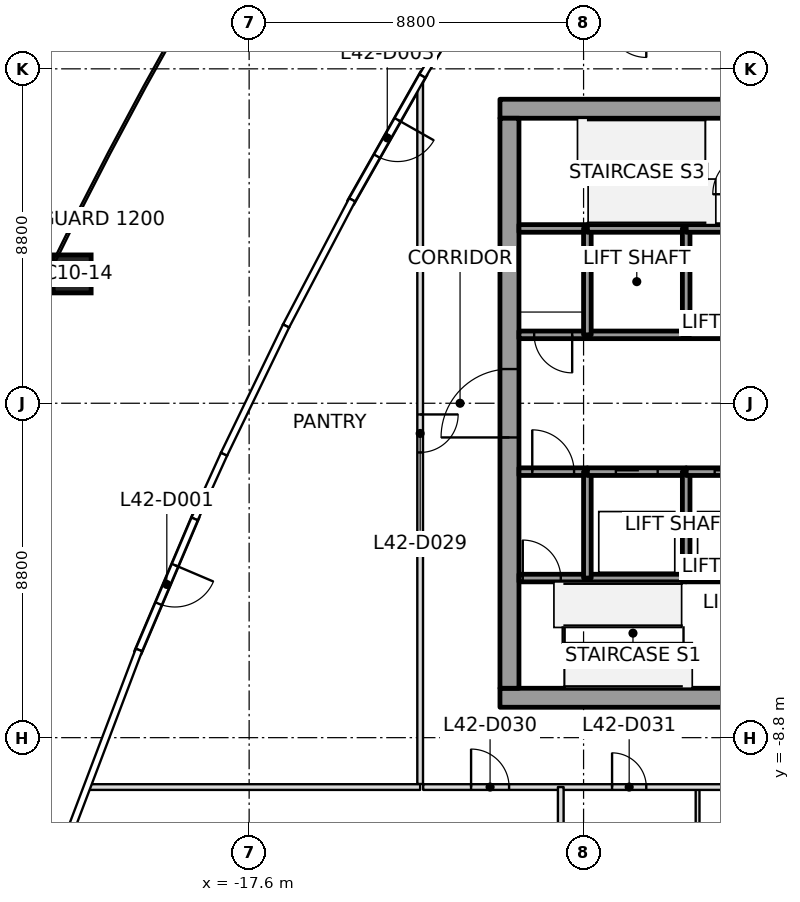
"""IFC4 building model, lengths in metres.
Left out: names, types, materials, properties, quantities, classifications, styles, units other than length and angle.
Written with IfcOpenShell. Run it as: python <this file> out.ifc"""

import sys

from ifc_helpers import new_model, si_unit, direction, frame, frame_2d, origin, origin_2d, place, context, subcontext, project, spatial, rectangle, extrude, element, fill, save


model = new_model("IFC4")
c1 = context("Model", 3, precision=1e-05, world=origin(), true_north=direction((0.0, 1.0)))
c2 = subcontext(c1, "Body", "Model", "MODEL_VIEW")
j1 = project(units=[si_unit("LENGTHUNIT", "METRE"), si_unit("PLANEANGLEUNIT", "RADIAN")], contexts=[c1])
p1 = place(None, origin())
s1 = spatial("IfcSite", under=j1, at=p1, CompositionType="ELEMENT")
p2 = place(p1, origin())
s2 = spatial("IfcBuilding", under=s1, at=p2, CompositionType="ELEMENT")
p3 = place(p2, frame((0.0, 0.0, 189.8)))
s3 = spatial("IfcBuildingStorey", under=s2, at=p3, CompositionType="ELEMENT", Elevation=189.8)
p4 = place(p3, frame((-22.257, 3.404, 0.0), z_axis=(0.014036674448, 0.002013957638, 0.999899452818), x_axis=(0.440228043652, 0.897850463868, -0.007988373739)))
e1 = element("IfcColumn", 1, at=p4, inside=s3, PredefinedType="COLUMN", context=c2, shape_type="SweptSolid", body=[
    extrude(rectangle(XDim=1.0, YDim=1.0, at=origin_2d()), origin(), (0.0, 0.0, 1.0), 4.0),
])
p5 = place(p3, frame((-11.0, -7.75, 0.0), z_axis=(0.0, 0.0, 1.0), x_axis=(1.0, 0.0, 0.0)))
e2 = element("IfcWall", 2, at=p5, inside=s3, PredefinedType="SHEAR", context=c2, shape_type="SweptSolid", body=[
    extrude(rectangle(XDim=22.0, YDim=0.5, at=frame_2d((11.0, 0.0))), origin(), (0.0, 0.0, 1.0), 4.0),
])
p6 = place(p5, frame((10.45, 0.0, 0.0)))
e3 = element("IfcOpeningElement", 3, at=p6, cuts=e2, PredefinedType="OPENING", context=c2, shape_type="SweptSolid", body=[
    extrude(rectangle(XDim=1.1, YDim=2.1, at=frame_2d((0.55, 1.05))), frame((0.0, 0.25, 0.0), z_axis=(0.0, -1.0, 0.0), x_axis=(1.0, 0.0, 0.0)), (0.0, 0.0, 1.0), 0.5),
])
p7 = place(p3, frame((-11.0, 7.75, 0.0), z_axis=(0.0, 0.0, 1.0), x_axis=(1.0, 0.0, 0.0)))
e4 = element("IfcWall", 4, at=p7, inside=s3, PredefinedType="SHEAR", context=c2, shape_type="SweptSolid", body=[
    extrude(rectangle(XDim=22.0, YDim=0.5, at=frame_2d((11.0, 0.0))), origin(), (0.0, 0.0, 1.0), 4.0),
])
p8 = place(p7, frame((10.45, 0.0, 0.0)))
e5 = element("IfcOpeningElement", 5, at=p8, cuts=e4, PredefinedType="OPENING", context=c2, shape_type="SweptSolid", body=[
    extrude(rectangle(XDim=1.1, YDim=2.1, at=frame_2d((0.55, 1.05))), frame((0.0, 0.25, 0.0), z_axis=(0.0, -1.0, 0.0), x_axis=(1.0, 0.0, 0.0)), (0.0, 0.0, 1.0), 0.5),
])
p9 = place(p3, frame((-10.75, -7.5, 0.0), z_axis=(0.0, 0.0, 1.0), x_axis=(0.0, 1.0, 0.0)))
e6 = element("IfcWall", 6, at=p9, inside=s3, PredefinedType="SHEAR", context=c2, shape_type="SweptSolid", body=[
    extrude(rectangle(XDim=15.0, YDim=0.5, at=frame_2d((7.5, 0.0))), origin(), (0.0, 0.0, 1.0), 4.0),
])
p10 = place(p9, frame((6.6, 0.0, 0.0)))
e7 = element("IfcOpeningElement", 7, at=p10, cuts=e6, PredefinedType="OPENING", context=c2, shape_type="SweptSolid", body=[
    extrude(rectangle(XDim=1.8, YDim=2.1, at=frame_2d((0.9, 1.05))), frame((0.0, 0.25, 0.0), z_axis=(0.0, -1.0, 0.0), x_axis=(1.0, 0.0, 0.0)), (0.0, 0.0, 1.0), 0.5),
])
p11 = place(p3, frame((-12.998, 8.689, 0.0), z_axis=(0.0, 0.0, 1.0), x_axis=(-0.492974917458, -0.870043522335, 0.0)))
e8 = element("IfcWall", 8, at=p11, inside=s3, PredefinedType="SOLIDWALL", context=c2, shape_type="SweptSolid", body=[
    extrude(rectangle(XDim=3.926, YDim=0.2, at=frame_2d((1.963, 0.0))), origin(), (0.0, 0.0, 1.0), 3.34),
])
p12 = place(p11, frame((1.413, 0.0, 0.0)))
e9 = element("IfcOpeningElement", 9, at=p12, cuts=e8, PredefinedType="OPENING", context=c2, shape_type="SweptSolid", body=[
    extrude(rectangle(XDim=1.1, YDim=2.1, at=frame_2d((0.55, 1.05))), frame((0.0, 0.1, 0.0), z_axis=(0.0, -1.0, 0.0), x_axis=(1.0, 0.0, 0.0)), (0.0, 0.0, 1.0), 0.2),
])
p13 = place(p3, frame((-18.999, -2.961, 0.0), z_axis=(0.0, 0.0, 1.0), x_axis=(-0.391065585554, -0.920362813132, 0.0)))
e10 = element("IfcWall", 10, at=p13, inside=s3, PredefinedType="SOLIDWALL", context=c2, shape_type="SweptSolid", body=[
    extrude(rectangle(XDim=3.926, YDim=0.2, at=frame_2d((1.963, 0.0))), origin(), (0.0, 0.0, 1.0), 3.247),
])
p14 = place(p13, frame((1.413, 0.0, 0.0)))
e11 = element("IfcOpeningElement", 11, at=p14, cuts=e10, PredefinedType="OPENING", context=c2, shape_type="SweptSolid", body=[
    extrude(rectangle(XDim=1.1, YDim=2.1, at=frame_2d((0.55, 1.05))), frame((0.0, 0.1, 0.0), z_axis=(0.0, -1.0, 0.0), x_axis=(1.0, 0.0, 0.0)), (0.0, 0.0, 1.0), 0.2),
])
p15 = place(p3, frame((-10.5, -4.6, 0.0), z_axis=(0.0, 0.0, 1.0), x_axis=(1.0, 0.0, 0.0)))
e12 = element("IfcWall", 12, at=p15, inside=s3, PredefinedType="SOLIDWALL", context=c2, shape_type="SweptSolid", body=[
    extrude(rectangle(XDim=1.8, YDim=0.2, at=frame_2d((0.9, 0.0))), origin(), (0.0, 0.0, 1.0), 3.85),
])
p16 = place(p15, frame((0.1, 0.0, 0.0)))
e13 = element("IfcOpeningElement", 13, at=p16, cuts=e12, PredefinedType="OPENING", context=c2, shape_type="SweptSolid", body=[
    extrude(rectangle(XDim=1.0, YDim=2.1, at=frame_2d((0.5, 1.05))), frame((0.0, 0.1, 0.0), z_axis=(0.0, -1.0, 0.0), x_axis=(1.0, 0.0, 0.0)), (0.0, 0.0, 1.0), 0.2),
])
p17 = place(p3, frame((-10.5, -1.8, 0.0), z_axis=(0.0, 0.0, 1.0), x_axis=(1.0, 0.0, 0.0)))
e14 = element("IfcWall", 14, at=p17, inside=s3, PredefinedType="SOLIDWALL", context=c2, shape_type="SweptSolid", body=[
    extrude(rectangle(XDim=1.8, YDim=0.2, at=frame_2d((0.9, 0.0))), origin(), (0.0, 0.0, 1.0), 3.85),
])
p18 = place(p17, frame((0.35, 0.0, 0.0)))
e15 = element("IfcOpeningElement", 15, at=p18, cuts=e14, PredefinedType="OPENING", context=c2, shape_type="SweptSolid", body=[
    extrude(rectangle(XDim=1.1, YDim=2.1, at=frame_2d((0.55, 1.05))), frame((0.0, 0.1, 0.0), z_axis=(0.0, -1.0, 0.0), x_axis=(1.0, 0.0, 0.0)), (0.0, 0.0, 1.0), 0.2),
])
p19 = place(p3, frame((-8.7, 1.8, 0.0), z_axis=(0.0, 0.0, 1.0), x_axis=(-1.0, 0.0, 0.0)))
e16 = element("IfcWall", 16, at=p19, inside=s3, PredefinedType="SOLIDWALL", context=c2, shape_type="SweptSolid", body=[
    extrude(rectangle(XDim=1.8, YDim=0.2, at=frame_2d((0.9, 0.0))), origin(), (0.0, 0.0, 1.0), 3.85),
])
p20 = place(p19, frame((0.4, 0.0, 0.0)))
e17 = element("IfcOpeningElement", 17, at=p20, cuts=e16, PredefinedType="OPENING", context=c2, shape_type="SweptSolid", body=[
    extrude(rectangle(XDim=1.0, YDim=2.1, at=frame_2d((0.5, 1.05))), frame((0.0, 0.1, 0.0), z_axis=(0.0, -1.0, 0.0), x_axis=(1.0, 0.0, 0.0)), (0.0, 0.0, 1.0), 0.2),
])
p21 = place(p3, frame((-8.7, 4.6, 0.0), z_axis=(0.0, 0.0, 1.0), x_axis=(-1.0, 0.0, 0.0)))
e18 = element("IfcWall", 18, at=p21, inside=s3, PredefinedType="SOLIDWALL", context=c2, shape_type="SweptSolid", body=[
    extrude(rectangle(XDim=1.8, YDim=0.2, at=frame_2d((0.9, 0.0))), origin(), (0.0, 0.0, 1.0), 3.85),
])
p22 = place(p3, frame((-8.7, -4.6, 0.0), z_axis=(0.0, 0.0, 1.0), x_axis=(1.0, 0.0, 0.0)))
e19 = element("IfcWall", 19, at=p22, inside=s3, PredefinedType="SOLIDWALL", context=c2, shape_type="SweptSolid", body=[
    extrude(rectangle(XDim=2.6, YDim=0.2, at=frame_2d((1.3, 0.0))), origin(), (0.0, 0.0, 1.0), 3.85),
])
p23 = place(p3, frame((-8.7, -4.6, 0.0), z_axis=(0.0, 0.0, 1.0), x_axis=(0.0, 1.0, 0.0)))
e20 = element("IfcWall", 20, at=p23, inside=s3, PredefinedType="SOLIDWALL", context=c2, shape_type="SweptSolid", body=[
    extrude(rectangle(XDim=2.8, YDim=0.2, at=frame_2d((1.4, 0.0))), origin(), (0.0, 0.0, 1.0), 3.85),
])
p24 = place(p3, frame((-8.7, -1.8, 0.0), z_axis=(0.0, 0.0, 1.0), x_axis=(1.0, 0.0, 0.0)))
e21 = element("IfcWall", 21, at=p24, inside=s3, PredefinedType="SOLIDWALL", context=c2, shape_type="SweptSolid", body=[
    extrude(rectangle(XDim=2.6, YDim=0.2, at=frame_2d((1.3, 0.0))), origin(), (0.0, 0.0, 1.0), 3.85),
])
p25 = place(p24, frame((0.75, 0.0, 0.0)))
e22 = element("IfcOpeningElement", 22, at=p25, cuts=e21, PredefinedType="OPENING", context=c2, shape_type="SweptSolid", body=[
    extrude(rectangle(XDim=1.1, YDim=2.1, at=frame_2d((0.55, 1.05))), frame((0.0, 0.1, 0.0), z_axis=(0.0, -1.0, 0.0), x_axis=(1.0, 0.0, 0.0)), (0.0, 0.0, 1.0), 0.2),
])
p26 = place(p3, frame((-6.1, 1.8, 0.0), z_axis=(0.0, 0.0, 1.0), x_axis=(-1.0, 0.0, 0.0)))
e23 = element("IfcWall", 23, at=p26, inside=s3, PredefinedType="SOLIDWALL", context=c2, shape_type="SweptSolid", body=[
    extrude(rectangle(XDim=2.6, YDim=0.2, at=frame_2d((1.3, 0.0))), origin(), (0.0, 0.0, 1.0), 3.85),
])
p27 = place(p3, frame((-8.7, 1.8, 0.0), z_axis=(0.0, 0.0, 1.0), x_axis=(0.0, 1.0, 0.0)))
e24 = element("IfcWall", 24, at=p27, inside=s3, PredefinedType="SOLIDWALL", context=c2, shape_type="SweptSolid", body=[
    extrude(rectangle(XDim=2.8, YDim=0.2, at=frame_2d((1.4, 0.0))), origin(), (0.0, 0.0, 1.0), 3.85),
])
p28 = place(p3, frame((-6.1, 4.6, 0.0), z_axis=(0.0, 0.0, 1.0), x_axis=(-1.0, 0.0, 0.0)))
e25 = element("IfcWall", 25, at=p28, inside=s3, PredefinedType="SOLIDWALL", context=c2, shape_type="SweptSolid", body=[
    extrude(rectangle(XDim=2.6, YDim=0.2, at=frame_2d((1.3, 0.0))), origin(), (0.0, 0.0, 1.0), 3.85),
])
p29 = place(p3, frame((-6.1, -4.6, 0.0), z_axis=(0.0, 0.0, 1.0), x_axis=(1.0, 0.0, 0.0)))
e26 = element("IfcWall", 26, at=p29, inside=s3, PredefinedType="SOLIDWALL", context=c2, shape_type="SweptSolid", body=[
    extrude(rectangle(XDim=1.6, YDim=0.2, at=frame_2d((0.8, 0.0))), origin(), (0.0, 0.0, 1.0), 3.85),
])
p30 = place(p3, frame((-6.1, -4.6, 0.0), z_axis=(0.0, 0.0, 1.0), x_axis=(0.0, 1.0, 0.0)))
e27 = element("IfcWall", 27, at=p30, inside=s3, PredefinedType="SOLIDWALL", context=c2, shape_type="SweptSolid", body=[
    extrude(rectangle(XDim=2.8, YDim=0.2, at=frame_2d((1.4, 0.0))), origin(), (0.0, 0.0, 1.0), 3.85),
])
p31 = place(p3, frame((-6.1, -1.8, 0.0), z_axis=(0.0, 0.0, 1.0), x_axis=(1.0, 0.0, 0.0)))
e28 = element("IfcWall", 28, at=p31, inside=s3, PredefinedType="SOLIDWALL", context=c2, shape_type="SweptSolid", body=[
    extrude(rectangle(XDim=2.6, YDim=0.2, at=frame_2d((1.3, 0.0))), origin(), (0.0, 0.0, 1.0), 3.85),
])
p32 = place(p31, frame((0.75, 0.0, 0.0)))
e29 = element("IfcOpeningElement", 29, at=p32, cuts=e28, PredefinedType="OPENING", context=c2, shape_type="SweptSolid", body=[
    extrude(rectangle(XDim=1.1, YDim=2.1, at=frame_2d((0.55, 1.05))), frame((0.0, 0.1, 0.0), z_axis=(0.0, -1.0, 0.0), x_axis=(1.0, 0.0, 0.0)), (0.0, 0.0, 1.0), 0.2),
])
p33 = place(p3, frame((-3.5, 1.8, 0.0), z_axis=(0.0, 0.0, 1.0), x_axis=(-1.0, 0.0, 0.0)))
e30 = element("IfcWall", 30, at=p33, inside=s3, PredefinedType="SOLIDWALL", context=c2, shape_type="SweptSolid", body=[
    extrude(rectangle(XDim=2.6, YDim=0.2, at=frame_2d((1.3, 0.0))), origin(), (0.0, 0.0, 1.0), 3.85),
])
p34 = place(p3, frame((-6.1, 1.8, 0.0), z_axis=(0.0, 0.0, 1.0), x_axis=(0.0, 1.0, 0.0)))
e31 = element("IfcWall", 31, at=p34, inside=s3, PredefinedType="SOLIDWALL", context=c2, shape_type="SweptSolid", body=[
    extrude(rectangle(XDim=2.8, YDim=0.2, at=frame_2d((1.4, 0.0))), origin(), (0.0, 0.0, 1.0), 3.85),
])
p35 = place(p3, frame((-4.3, 4.6, 0.0), z_axis=(0.0, 0.0, 1.0), x_axis=(-1.0, 0.0, 0.0)))
e32 = element("IfcWall", 32, at=p35, inside=s3, PredefinedType="SOLIDWALL", context=c2, shape_type="SweptSolid", body=[
    extrude(rectangle(XDim=1.8, YDim=0.2, at=frame_2d((0.9, 0.0))), origin(), (0.0, 0.0, 1.0), 3.85),
])
p36 = place(p3, frame((-13.1, -10.1, 0.0), z_axis=(0.0, 0.0, 1.0), x_axis=(-1.0, 0.0, 0.0)))
e33 = element("IfcWall", 33, at=p36, inside=s3, PredefinedType="PARTITIONING", context=c2, shape_type="SweptSolid", body=[
    extrude(rectangle(XDim=8.792, YDim=0.15, at=frame_2d((4.396, 0.0))), origin(), (0.0, 0.0, 1.0), 3.166),
])
p37 = place(p3, frame((-9.4, -10.1, 0.0), z_axis=(0.0, 0.0, 1.0), x_axis=(0.0, -1.0, 0.0)))
e34 = element("IfcWall", 34, at=p37, inside=s3, PredefinedType="PARTITIONING", context=c2, shape_type="SweptSolid", body=[
    extrude(rectangle(XDim=11.267, YDim=0.15, at=frame_2d((5.633, 0.0))), origin(), (0.0, 0.0, 1.0), 3.234),
])
p38 = place(p3, frame((-13.1, 8.511, 0.0), z_axis=(0.0, 0.0, 1.0), x_axis=(0.0, -1.0, 0.0)))
e35 = element("IfcWall", 35, at=p38, inside=s3, PredefinedType="PARTITIONING", context=c2, shape_type="SweptSolid", body=[
    extrude(rectangle(XDim=18.531, YDim=0.15, at=frame_2d((9.265, 0.0))), origin(), (0.0, 0.0, 1.0), 3.166),
])
p39 = place(p38, frame((8.805, 0.0, 0.0)))
e36 = element("IfcOpeningElement", 36, at=p39, cuts=e35, PredefinedType="OPENING", context=c2, shape_type="SweptSolid", body=[
    extrude(rectangle(XDim=1.0, YDim=2.1, at=frame_2d((0.5, 1.05))), frame((0.0, 0.075, 0.0), z_axis=(0.0, -1.0, 0.0), x_axis=(1.0, 0.0, 0.0)), (0.0, 0.0, 1.0), 0.15),
])
p40 = place(p3, frame((-13.02, -10.1, 0.0), z_axis=(0.0, 0.0, 1.0), x_axis=(1.0, 0.0, 0.0)))
e37 = element("IfcWall", 37, at=p40, inside=s3, PredefinedType="PARTITIONING", context=c2, shape_type="SweptSolid", body=[
    extrude(rectangle(XDim=26.04, YDim=0.15, at=frame_2d((13.02, 0.0))), origin(), (0.0, 0.0, 1.0), 3.317),
])
p41 = place(p40, frame((1.26, 0.0, 0.0)))
e38 = element("IfcOpeningElement", 38, at=p41, cuts=e37, PredefinedType="OPENING", context=c2, shape_type="SweptSolid", body=[
    extrude(rectangle(XDim=1.0, YDim=2.1, at=frame_2d((0.5, 1.05))), frame((0.0, 0.075, 0.0), z_axis=(0.0, -1.0, 0.0), x_axis=(1.0, 0.0, 0.0)), (0.0, 0.0, 1.0), 0.15),
])
p42 = place(p40, frame((4.97, 0.0, 0.0)))
e39 = element("IfcOpeningElement", 39, at=p42, cuts=e37, PredefinedType="OPENING", context=c2, shape_type="SweptSolid", body=[
    extrude(rectangle(XDim=0.9, YDim=2.1, at=frame_2d((0.45, 1.05))), frame((0.0, 0.075, 0.0), z_axis=(0.0, -1.0, 0.0), x_axis=(1.0, 0.0, 0.0)), (0.0, 0.0, 1.0), 0.15),
])
p43 = place(p40, frame((9.47, 0.0, 0.0)))
e40 = element("IfcOpeningElement", 40, at=p43, cuts=e37, PredefinedType="OPENING", context=c2, shape_type="SweptSolid", body=[
    extrude(rectangle(XDim=1.0, YDim=2.1, at=frame_2d((0.5, 1.05))), frame((0.0, 0.075, 0.0), z_axis=(0.0, -1.0, 0.0), x_axis=(1.0, 0.0, 0.0)), (0.0, 0.0, 1.0), 0.15),
])
p44 = place(p40, frame((13.67, 0.0, 0.0)))
e41 = element("IfcOpeningElement", 41, at=p44, cuts=e37, PredefinedType="OPENING", context=c2, shape_type="SweptSolid", body=[
    extrude(rectangle(XDim=0.9, YDim=2.1, at=frame_2d((0.45, 1.05))), frame((0.0, 0.075, 0.0), z_axis=(0.0, -1.0, 0.0), x_axis=(1.0, 0.0, 0.0)), (0.0, 0.0, 1.0), 0.15),
])
p45 = place(p40, frame((20.42, 0.0, 0.0)))
e42 = element("IfcOpeningElement", 42, at=p45, cuts=e37, PredefinedType="OPENING", context=c2, shape_type="SweptSolid", body=[
    extrude(rectangle(XDim=1.0, YDim=2.1, at=frame_2d((0.5, 1.05))), frame((0.0, 0.075, 0.0), z_axis=(0.0, -1.0, 0.0), x_axis=(1.0, 0.0, 0.0)), (0.0, 0.0, 1.0), 0.15),
])
p46 = place(p3, frame((-5.8, -10.13, 0.0), z_axis=(0.0, 0.0, 1.0), x_axis=(0.0, -1.0, 0.0)))
e43 = element("IfcWall", 43, at=p46, inside=s3, PredefinedType="PARTITIONING", context=c2, shape_type="SweptSolid", body=[
    extrude(rectangle(XDim=4.17, YDim=0.1, at=frame_2d((2.085, 0.0))), origin(), (0.0, 0.0, 1.0), 3.45),
])
p47 = place(p12, origin())
e44 = element("IfcDoor", 44, at=p47, inside=s3, OperationType="SINGLE_SWING_LEFT", PredefinedType="DOOR", context=c2, shape_type="SweptSolid", body=[
    extrude(rectangle(XDim=1.1, YDim=2.1, at=frame_2d((0.55, 1.05))), frame((0.0, 0.025, 0.0), z_axis=(0.0, -1.0, 0.0), x_axis=(1.0, 0.0, 0.0)), (0.0, 0.0, 1.0), 0.05),
])
fill(e9, e44)
p48 = place(p14, origin())
e45 = element("IfcDoor", 45, at=p48, inside=s3, OperationType="SINGLE_SWING_RIGHT", PredefinedType="DOOR", context=c2, shape_type="SweptSolid", body=[
    extrude(rectangle(XDim=1.1, YDim=2.1, at=frame_2d((0.55, 1.05))), frame((0.0, 0.025, 0.0), z_axis=(0.0, -1.0, 0.0), x_axis=(1.0, 0.0, 0.0)), (0.0, 0.0, 1.0), 0.05),
])
fill(e11, e45)
p49 = place(p39, origin())
e46 = element("IfcDoor", 46, at=p49, inside=s3, OperationType="SINGLE_SWING_RIGHT", PredefinedType="DOOR", context=c2, shape_type="SweptSolid", body=[
    extrude(rectangle(XDim=1.0, YDim=2.1, at=frame_2d((0.5, 1.05))), frame((0.0, 0.025, 0.0), z_axis=(0.0, -1.0, 0.0), x_axis=(1.0, 0.0, 0.0)), (0.0, 0.0, 1.0), 0.05),
])
fill(e36, e46)
p50 = place(p41, origin())
e47 = element("IfcDoor", 47, at=p50, inside=s3, OperationType="SINGLE_SWING_RIGHT", PredefinedType="DOOR", context=c2, shape_type="SweptSolid", body=[
    extrude(rectangle(XDim=1.0, YDim=2.1, at=frame_2d((0.5, 1.05))), frame((0.0, 0.025, 0.0), z_axis=(0.0, -1.0, 0.0), x_axis=(1.0, 0.0, 0.0)), (0.0, 0.0, 1.0), 0.05),
])
fill(e38, e47)
p51 = place(p42, origin())
e48 = element("IfcDoor", 48, at=p51, inside=s3, OperationType="SINGLE_SWING_LEFT", PredefinedType="DOOR", context=c2, shape_type="SweptSolid", body=[
    extrude(rectangle(XDim=0.9, YDim=2.1, at=frame_2d((0.45, 1.05))), frame((0.0, 0.025, 0.0), z_axis=(0.0, -1.0, 0.0), x_axis=(1.0, 0.0, 0.0)), (0.0, 0.0, 1.0), 0.05),
])
fill(e39, e48)
p52 = place(p25, origin())
e49 = element("IfcDoor", 49, at=p52, inside=s3, OperationType="SLIDING_TO_LEFT", PredefinedType="DOOR", context=c2, shape_type="SweptSolid", body=[
    extrude(rectangle(XDim=1.1, YDim=2.1, at=frame_2d((0.55, 1.05))), frame((0.0, 0.025, 0.0), z_axis=(0.0, -1.0, 0.0), x_axis=(1.0, 0.0, 0.0)), (0.0, 0.0, 1.0), 0.05),
])
fill(e22, e49)
p53 = place(p32, origin())
e50 = element("IfcDoor", 50, at=p53, inside=s3, OperationType="SLIDING_TO_RIGHT", PredefinedType="DOOR", context=c2, shape_type="SweptSolid", body=[
    extrude(rectangle(XDim=1.1, YDim=2.1, at=frame_2d((0.55, 1.05))), frame((0.0, 0.025, 0.0), z_axis=(0.0, -1.0, 0.0), x_axis=(1.0, 0.0, 0.0)), (0.0, 0.0, 1.0), 0.05),
])
fill(e29, e50)
p54 = place(p18, origin())
e51 = element("IfcDoor", 51, at=p54, inside=s3, OperationType="SINGLE_SWING_RIGHT", PredefinedType="DOOR", context=c2, shape_type="SweptSolid", body=[
    extrude(rectangle(XDim=1.1, YDim=2.1, at=frame_2d((0.55, 1.05))), frame((0.0, 0.025, 0.0), z_axis=(0.0, -1.0, 0.0), x_axis=(1.0, 0.0, 0.0)), (0.0, 0.0, 1.0), 0.05),
])
fill(e15, e51)
p55 = place(p20, origin())
e52 = element("IfcDoor", 52, at=p55, inside=s3, OperationType="SINGLE_SWING_LEFT", PredefinedType="DOOR", context=c2, shape_type="SweptSolid", body=[
    extrude(rectangle(XDim=1.0, YDim=2.1, at=frame_2d((0.5, 1.05))), frame((0.0, 0.025, 0.0), z_axis=(0.0, -1.0, 0.0), x_axis=(1.0, 0.0, 0.0)), (0.0, 0.0, 1.0), 0.05),
])
fill(e17, e52)
p56 = place(p16, origin())
e53 = element("IfcDoor", 53, at=p56, inside=s3, OperationType="SINGLE_SWING_LEFT", PredefinedType="DOOR", context=c2, shape_type="SweptSolid", body=[
    extrude(rectangle(XDim=1.0, YDim=2.1, at=frame_2d((0.5, 1.05))), frame((0.0, 0.025, 0.0), z_axis=(0.0, -1.0, 0.0), x_axis=(1.0, 0.0, 0.0)), (0.0, 0.0, 1.0), 0.05),
])
fill(e13, e53)
p57 = place(p10, origin())
e54 = element("IfcDoor", 54, at=p57, inside=s3, OperationType="DOUBLE_DOOR_SINGLE_SWING", PredefinedType="DOOR", context=c2, shape_type="SweptSolid", body=[
    extrude(rectangle(XDim=1.8, YDim=2.1, at=frame_2d((0.9, 1.05))), frame((0.0, 0.025, 0.0), z_axis=(0.0, -1.0, 0.0), x_axis=(1.0, 0.0, 0.0)), (0.0, 0.0, 1.0), 0.05),
])
fill(e7, e54)
save(model, sys.argv[1])
